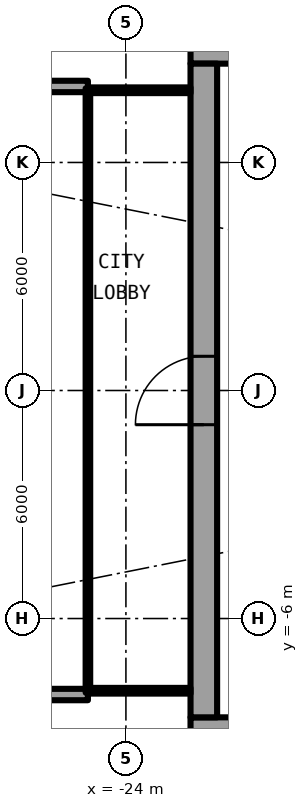
"""IFC4 building model, lengths in metres.
Left out: names, types, materials, properties, quantities, classifications, styles, units other than length and angle.
Written with IfcOpenShell. Run it as: python <this file> out.ifc"""

import sys

from ifc_helpers import new_model, si_unit, direction, frame, frame_2d, origin, place, context, subcontext, project, spatial, rectangle, extrude, element, fill, save


model = new_model("IFC4")
c1 = context("Model", 3, precision=1e-05, world=origin(), true_north=direction((0.0, 1.0)))
c2 = subcontext(c1, "Body", "Model", "MODEL_VIEW")
j1 = project(units=[si_unit("LENGTHUNIT", "METRE"), si_unit("PLANEANGLEUNIT", "RADIAN")], contexts=[c1])
p1 = place(None, origin())
s1 = spatial("IfcSite", under=j1, at=p1, CompositionType="ELEMENT")
p2 = place(p1, origin())
s2 = spatial("IfcBuilding", under=s1, at=p2, CompositionType="ELEMENT")
p3 = place(p2, frame((0.0, 0.0, 88.0)))
s3 = spatial("IfcBuildingStorey", under=s2, at=p3, CompositionType="ELEMENT", Elevation=88.0)
for number, where, z_axis, x_axis in (
    (1, (-25.0, 8.0, 0.0), (0.0, 0.0, 1.0), (-1.0, 0.0, 0.0)),
    (2, (-25.0, -8.0, 0.0), (0.0, 0.0, 1.0), (-1.0, 0.0, 0.0)),
):
    element("IfcWall", number, at=place(p3, frame(where, z_axis=z_axis, x_axis=x_axis)), inside=s3, PredefinedType="SOLIDWALL", context=c2, shape_type="SweptSolid", body=[
        extrude(rectangle(XDim=2.667, YDim=0.3, at=frame_2d((1.333, 0.0))), origin(), (0.0, 0.0, 1.0), 2.7),
    ])
p4 = place(p3, frame((-22.3, -8.95, 0.0), z_axis=(0.0, 0.0, 1.0), x_axis=(1.0, 0.0, 0.0)))
e3 = element("IfcWall", 3, at=p4, inside=s3, PredefinedType="SHEAR", context=c2, shape_type="SweptSolid", body=[
    extrude(rectangle(XDim=14.0, YDim=0.7, at=frame_2d((7.0, 0.0))), origin(), (0.0, 0.0, 1.0), 3.05),
])
p5 = place(p4, frame((1.225, 0.0, 0.0)))
e4 = element("IfcOpeningElement", 4, at=p5, cuts=e3, PredefinedType="OPENING", context=c2, shape_type="SweptSolid", body=[
    extrude(rectangle(XDim=1.2, YDim=2.3, at=frame_2d((0.6, 1.15))), frame((0.0, 0.36, 0.0), z_axis=(0.0, -1.0, 0.0), x_axis=(1.0, 0.0, 0.0)), (0.0, 0.0, 1.0), 0.72),
])
p6 = place(p3, frame((-8.3, 8.95, 0.0), z_axis=(0.0, 0.0, 1.0), x_axis=(-1.0, 0.0, 0.0)))
e5 = element("IfcWall", 5, at=p6, inside=s3, PredefinedType="SHEAR", context=c2, shape_type="SweptSolid", body=[
    extrude(rectangle(XDim=14.0, YDim=0.7, at=frame_2d((7.0, 0.0))), origin(), (0.0, 0.0, 1.0), 3.05),
])
p7 = place(p6, frame((11.575, 0.0, 0.0)))
e6 = element("IfcOpeningElement", 6, at=p7, cuts=e5, PredefinedType="OPENING", context=c2, shape_type="SweptSolid", body=[
    extrude(rectangle(XDim=1.2, YDim=2.3, at=frame_2d((0.6, 1.15))), frame((0.0, 0.36, 0.0), z_axis=(0.0, -1.0, 0.0), x_axis=(1.0, 0.0, 0.0)), (0.0, 0.0, 1.0), 0.72),
])
p8 = place(p3, frame((-21.95, -8.6, 0.0), z_axis=(0.0, 0.0, 1.0), x_axis=(0.0, 1.0, 0.0)))
e7 = element("IfcWall", 7, at=p8, inside=s3, PredefinedType="SHEAR", context=c2, shape_type="SweptSolid", body=[
    extrude(rectangle(XDim=17.2, YDim=0.7, at=frame_2d((8.6, 0.0))), origin(), (0.0, 0.0, 1.0), 3.05),
])
p9 = place(p8, frame((7.7, 0.0, 0.0)))
e8 = element("IfcOpeningElement", 8, at=p9, cuts=e7, PredefinedType="OPENING", context=c2, shape_type="SweptSolid", body=[
    extrude(rectangle(XDim=1.8, YDim=2.3, at=frame_2d((0.9, 1.15))), frame((0.0, 0.36, 0.0), z_axis=(0.0, -1.0, 0.0), x_axis=(1.0, 0.0, 0.0)), (0.0, 0.0, 1.0), 0.72),
])
for number, where, z_axis, x_axis in (
    (9, (-22.3, 7.9, 0.0), (0.0, 0.0, 1.0), (-1.0, 0.0, 0.0)),
    (10, (-22.3, -7.9, 0.0), (0.0, 0.0, 1.0), (-1.0, 0.0, 0.0)),
):
    element("IfcWall", number, at=place(p3, frame(where, z_axis=z_axis, x_axis=x_axis)), inside=s3, PredefinedType="PARTITIONING", context=c2, shape_type="SweptSolid", body=[
        extrude(rectangle(XDim=2.64, YDim=0.15, at=frame_2d((1.32, 0.0))), origin(), (0.0, 0.0, 1.0), 2.7),
    ])
p10 = place(p3, frame((-25.0, 7.95, 0.0), z_axis=(0.0, 0.0, 1.0), x_axis=(0.0, -1.0, 0.0)))
e11 = element("IfcWall", 11, at=p10, inside=s3, PredefinedType="PARTITIONING", context=c2, shape_type="SweptSolid", body=[
    extrude(rectangle(XDim=15.9, YDim=0.12, at=frame_2d((7.95, 0.0))), origin(), (0.0, 0.0, 1.0), 2.7),
])
p11 = place(p10, frame((0.95, 0.0, 0.1)))
e12 = element("IfcOpeningElement", 12, at=p11, cuts=e11, PredefinedType="OPENING", context=c2, shape_type="SweptSolid", body=[
    extrude(rectangle(XDim=14.0, YDim=2.35, at=frame_2d((7.0, 1.175))), frame((0.0, 0.07, 0.0), z_axis=(0.0, -1.0, 0.0), x_axis=(1.0, 0.0, 0.0)), (0.0, 0.0, 1.0), 0.14),
])
p12 = place(p9, origin())
e13 = element("IfcDoor", 13, at=p12, inside=s3, OperationType="SINGLE_SWING_LEFT", PredefinedType="DOOR", context=c2, shape_type="SweptSolid", body=[
    extrude(rectangle(XDim=1.8, YDim=2.3, at=frame_2d((0.9, 1.15))), frame((0.0, 0.025, 0.0), z_axis=(0.0, -1.0, 0.0), x_axis=(1.0, 0.0, 0.0)), (0.0, 0.0, 1.0), 0.05),
])
fill(e8, e13)
p13 = place(p11, origin())
e14 = element("IfcWindow", 14, at=p13, inside=s3, PartitioningType="SINGLE_PANEL", PredefinedType="WINDOW", context=c2, shape_type="SweptSolid", body=[
    extrude(rectangle(XDim=14.0, YDim=2.35, at=frame_2d((7.0, 1.175))), frame((0.0, 0.03, 0.0), z_axis=(0.0, -1.0, 0.0), x_axis=(1.0, 0.0, 0.0)), (0.0, 0.0, 1.0), 0.06),
])
fill(e12, e14)
save(model, sys.argv[1])
